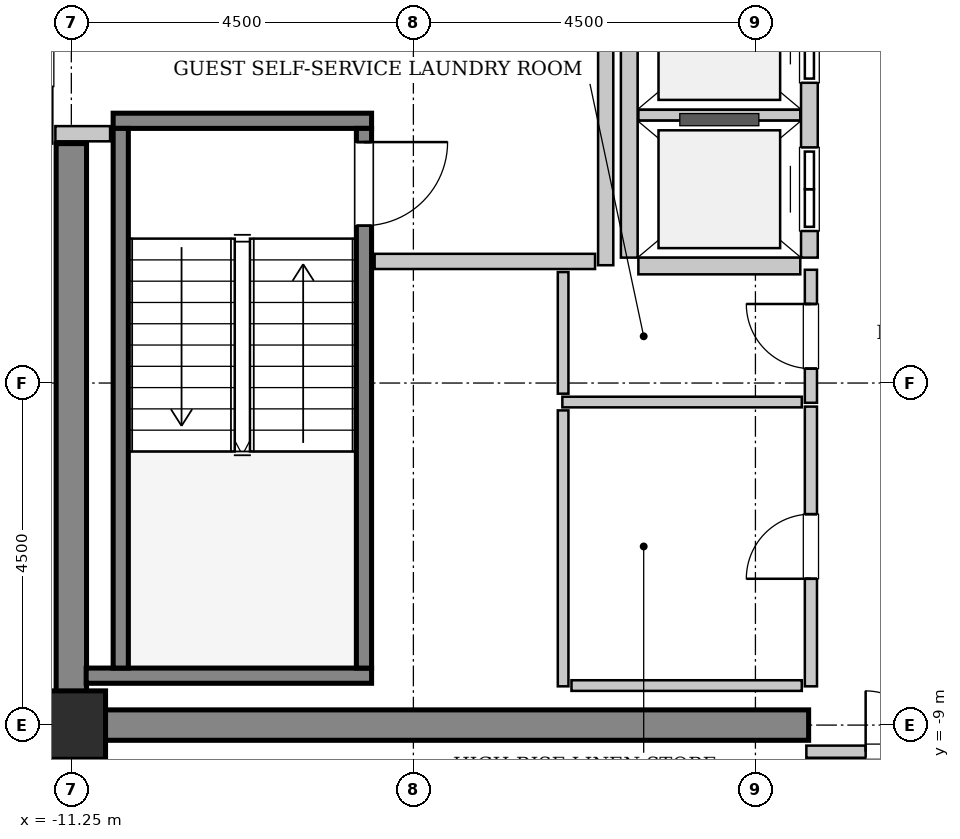
"""IFC4 building model, lengths in metres.
Left out: names, types, materials, properties, quantities, classifications, styles, units other than length and angle.
Written with IfcOpenShell. Run it as: python <this file> out.ifc"""

import sys

from ifc_helpers import new_model, si_unit, direction, frame, frame_2d, origin, origin_2d, place, context, subcontext, project, spatial, rectangle, extrude, source, transform, mapped, element, fill, save


model = new_model("IFC4")
c1 = context("Model", 3, precision=1e-05, world=origin(), true_north=direction((0.0, 1.0)))
c2 = subcontext(c1, "Body", "Model", "MODEL_VIEW")
j1 = project(units=[si_unit("LENGTHUNIT", "METRE"), si_unit("PLANEANGLEUNIT", "RADIAN")], contexts=[c1])
p1 = place(None, origin())
s1 = spatial("IfcSite", under=j1, at=p1, CompositionType="ELEMENT")
p2 = place(p1, origin())
s2 = spatial("IfcBuilding", under=s1, at=p2, CompositionType="ELEMENT")
p3 = place(p2, frame((0.0, 0.0, 345.2)))
s3 = spatial("IfcBuildingStorey", under=s2, at=p3, CompositionType="ELEMENT", Elevation=345.2)
m1 = source(origin(), c2, "Body", "SweptSolid", [
    extrude(rectangle(XDim=9.9, YDim=0.4, at=frame_2d((4.95, 0.0))), origin(), (0.0, 0.0, 1.0), 3.8),
])
p4 = place(p3, frame((-11.45, -9.0, 0.0), z_axis=(0.0, 0.0, 1.0), x_axis=(1.0, 0.0, 0.0)))
e1 = element("IfcWall", 1, at=p4, inside=s3, PredefinedType="SHEAR", context=c2, shape_type="MappedRepresentation", body=[
    mapped(m1, transform((0.0, 0.0, 0.0), x_axis=(1.0, 0.0, 0.0), y_axis=(0.0, 1.0, 0.0), z_axis=(0.0, 0.0, 1.0), scale=1.0)),
])
m2 = source(origin(), c2, "Body", "SweptSolid", [
    extrude(rectangle(XDim=7.45, YDim=0.4, at=frame_2d((3.725, 0.0))), origin(), (0.0, 0.0, 1.0), 3.8),
])
p5 = place(p3, frame((-11.25, -8.8, 0.0), z_axis=(0.0, 0.0, 1.0), x_axis=(0.0, 1.0, 0.0)))
e2 = element("IfcWall", 2, at=p5, inside=s3, PredefinedType="SHEAR", context=c2, shape_type="MappedRepresentation", body=[
    mapped(m2, transform((0.0, 0.0, 0.0), x_axis=(1.0, 0.0, 0.0), y_axis=(0.0, 1.0, 0.0), z_axis=(0.0, 0.0, 1.0), scale=1.0)),
])
m3 = source(origin(), c2, "Body", "SweptSolid", [
    extrude(rectangle(XDim=0.9, YDim=0.9, at=origin_2d()), origin(), (0.0, 0.0, 1.0), 3.8),
])
p6 = place(p3, frame((-11.25, -9.0, 0.0), z_axis=(0.0, 0.0, 1.0), x_axis=(1.0, 0.0, 0.0)))
e3 = element("IfcColumn", 3, at=p6, inside=s3, PredefinedType="COLUMN", context=c2, shape_type="MappedRepresentation", body=[
    mapped(m3, transform((0.0, 0.0, 0.0), x_axis=(1.0, 0.0, 0.0), y_axis=(0.0, 1.0, 0.0), z_axis=(0.0, 0.0, 1.0), scale=1.0)),
])
m4 = source(origin(), c2, "Body", "SweptSolid", [
    extrude(rectangle(XDim=3.4, YDim=0.2, at=frame_2d((1.7, 0.0))), origin(), (0.0, 0.0, 1.0), 3.8),
])
p7 = place(p3, frame((-10.7, -1.05, 0.0), z_axis=(0.0, 0.0, 1.0), x_axis=(1.0, 0.0, 0.0)))
e4 = element("IfcWall", 4, at=p7, inside=s3, PredefinedType="SOLIDWALL", context=c2, shape_type="MappedRepresentation", body=[
    mapped(m4, transform((0.0, 0.0, 0.0), x_axis=(1.0, 0.0, 0.0), y_axis=(0.0, 1.0, 0.0), z_axis=(0.0, 0.0, 1.0), scale=1.0)),
])
m5 = source(origin(), c2, "Body", "SweptSolid", [
    extrude(rectangle(XDim=3.755, YDim=0.2, at=frame_2d((1.877, 0.0))), origin(), (0.0, 0.0, 1.0), 3.8),
])
p8 = place(p3, frame((-11.055, -8.35, 0.0), z_axis=(0.0, 0.0, 1.0), x_axis=(1.0, 0.0, 0.0)))
e5 = element("IfcWall", 5, at=p8, inside=s3, PredefinedType="SOLIDWALL", context=c2, shape_type="MappedRepresentation", body=[
    mapped(m5, transform((0.0, 0.0, 0.0), x_axis=(1.0, 0.0, 0.0), y_axis=(0.0, 1.0, 0.0), z_axis=(0.0, 0.0, 1.0), scale=1.0)),
])
m6 = source(origin(), c2, "Body", "SweptSolid", [
    extrude(rectangle(XDim=7.1, YDim=0.2, at=frame_2d((3.55, 0.0))), origin(), (0.0, 0.0, 1.0), 3.8),
])
p9 = place(p3, frame((-10.6, -1.15, 0.0), z_axis=(0.0, 0.0, 1.0), x_axis=(0.0, -1.0, 0.0)))
e6 = element("IfcWall", 6, at=p9, inside=s3, PredefinedType="SOLIDWALL", context=c2, shape_type="MappedRepresentation", body=[
    mapped(m6, transform((0.0, 0.0, 0.0), x_axis=(1.0, 0.0, 0.0), y_axis=(0.0, 1.0, 0.0), z_axis=(0.0, 0.0, 1.0), scale=1.0)),
])
p10 = place(p3, frame((-7.4, -1.15, 0.0), z_axis=(0.0, 0.0, 1.0), x_axis=(0.0, -1.0, 0.0)))
e7 = element("IfcWall", 7, at=p10, inside=s3, PredefinedType="SOLIDWALL", context=c2, shape_type="MappedRepresentation", body=[
    mapped(m6, transform((0.0, 0.0, 0.0), x_axis=(1.0, 0.0, 0.0), y_axis=(0.0, 1.0, 0.0), z_axis=(0.0, 0.0, 1.0), scale=1.0)),
])
p11 = place(p10, frame((0.18, 0.0, 0.0)))
e8 = element("IfcOpeningElement", 8, at=p11, cuts=e7, PredefinedType="OPENING", context=c2, shape_type="SweptSolid", body=[
    extrude(rectangle(XDim=1.1, YDim=2.15, at=frame_2d((0.55, 1.075))), frame((0.0, 0.11, 0.0), z_axis=(0.0, -1.0, 0.0), x_axis=(1.0, 0.0, 0.0)), (0.0, 0.0, 1.0), 0.22),
])
m7 = source(origin(), c2, "Body", "SweptSolid", [
    extrude(rectangle(XDim=5.7, YDim=0.22, at=frame_2d((2.85, 0.0))), origin(), (0.0, 0.0, 1.0), 3.485),
])
p12 = place(p3, frame((-1.54, -2.85, 0.0), z_axis=(0.0, 0.0, 1.0), x_axis=(0.0, 1.0, 0.0)))
e9 = element("IfcWall", 9, at=p12, inside=s3, PredefinedType="SOLIDWALL", context=c2, shape_type="MappedRepresentation", body=[
    mapped(m7, transform((0.0, 0.0, 0.0), x_axis=(1.0, 0.0, 0.0), y_axis=(0.0, 1.0, 0.0), z_axis=(0.0, 0.0, 1.0), scale=1.0)),
])
p13 = place(p12, frame((0.35, 0.0, 0.0)))
e10 = element("IfcOpeningElement", 10, at=p13, cuts=e9, PredefinedType="OPENING", context=c2, shape_type="SweptSolid", body=[
    extrude(rectangle(XDim=1.1, YDim=2.2, at=frame_2d((0.55, 1.1))), frame((0.0, 0.12, 0.0), z_axis=(0.0, -1.0, 0.0), x_axis=(1.0, 0.0, 0.0)), (0.0, 0.0, 1.0), 0.24),
])
p14 = place(p12, frame((2.3, 0.0, 0.0)))
e11 = element("IfcOpeningElement", 11, at=p14, cuts=e9, PredefinedType="OPENING", context=c2, shape_type="SweptSolid", body=[
    extrude(rectangle(XDim=1.1, YDim=2.2, at=frame_2d((0.55, 1.1))), frame((0.0, 0.12, 0.0), z_axis=(0.0, -1.0, 0.0), x_axis=(1.0, 0.0, 0.0)), (0.0, 0.0, 1.0), 0.24),
])
p15 = place(p12, frame((4.25, 0.0, 0.0)))
e12 = element("IfcOpeningElement", 12, at=p15, cuts=e9, PredefinedType="OPENING", context=c2, shape_type="SweptSolid", body=[
    extrude(rectangle(XDim=1.1, YDim=2.2, at=frame_2d((0.55, 1.1))), frame((0.0, 0.12, 0.0), z_axis=(0.0, -1.0, 0.0), x_axis=(1.0, 0.0, 0.0)), (0.0, 0.0, 1.0), 0.24),
])
p16 = place(p3, frame((-3.91, 2.85, 0.0), z_axis=(0.0, 0.0, 1.0), x_axis=(0.0, -1.0, 0.0)))
e13 = element("IfcWall", 13, at=p16, inside=s3, PredefinedType="SOLIDWALL", context=c2, shape_type="MappedRepresentation", body=[
    mapped(m7, transform((0.0, 0.0, 0.0), x_axis=(1.0, 0.0, 0.0), y_axis=(0.0, 1.0, 0.0), z_axis=(0.0, 0.0, 1.0), scale=1.0)),
])
m8 = source(origin(), c2, "Body", "SweptSolid", [
    extrude(rectangle(XDim=2.13, YDim=0.22, at=frame_2d((1.065, 0.0))), origin(), (0.0, 0.0, 1.0), 3.485),
])
p17 = place(p3, frame((-3.79, -2.96, 0.0), z_axis=(0.0, 0.0, 1.0), x_axis=(1.0, 0.0, 0.0)))
e14 = element("IfcWall", 14, at=p17, inside=s3, PredefinedType="SOLIDWALL", context=c2, shape_type="MappedRepresentation", body=[
    mapped(m8, transform((0.0, 0.0, 0.0), x_axis=(1.0, 0.0, 0.0), y_axis=(0.0, 1.0, 0.0), z_axis=(0.0, 0.0, 1.0), scale=1.0)),
])
m9 = source(origin(), c2, "Body", "SweptSolid", [
    extrude(rectangle(XDim=2.13, YDim=0.14, at=frame_2d((1.065, 0.0))), origin(), (0.0, 0.0, 1.0), 3.485),
])
p18 = place(p3, frame((-3.79, -0.975, 0.0), z_axis=(0.0, 0.0, 1.0), x_axis=(1.0, 0.0, 0.0)))
e15 = element("IfcWall", 15, at=p18, inside=s3, PredefinedType="PARTITIONING", context=c2, shape_type="MappedRepresentation", body=[
    mapped(m9, transform((0.0, 0.0, 0.0), x_axis=(1.0, 0.0, 0.0), y_axis=(0.0, 1.0, 0.0), z_axis=(0.0, 0.0, 1.0), scale=1.0)),
])
m10 = source(origin(), c2, "Body", "SweptSolid", [
    extrude(rectangle(XDim=5.9, YDim=0.2, at=frame_2d((2.95, 0.0))), origin(), (0.0, 0.0, 1.0), 3.485),
])
p19 = place(p3, frame((-4.22, -2.95, 0.0), z_axis=(0.0, 0.0, 1.0), x_axis=(0.0, 1.0, 0.0)))
e16 = element("IfcWall", 16, at=p19, inside=s3, PredefinedType="PARTITIONING", context=c2, shape_type="MappedRepresentation", body=[
    mapped(m10, transform((0.0, 0.0, 0.0), x_axis=(1.0, 0.0, 0.0), y_axis=(0.0, 1.0, 0.0), z_axis=(0.0, 0.0, 1.0), scale=1.0)),
])
m11 = source(origin(), c2, "Body", "SweptSolid", [
    extrude(rectangle(XDim=2.9, YDim=0.2, at=frame_2d((1.45, 0.0))), origin(), (0.0, 0.0, 1.0), 3.485),
])
p20 = place(p3, frame((-7.26, -2.9, 0.0), z_axis=(0.0, 0.0, 1.0), x_axis=(1.0, 0.0, 0.0)))
e17 = element("IfcWall", 17, at=p20, inside=s3, PredefinedType="PARTITIONING", context=c2, shape_type="MappedRepresentation", body=[
    mapped(m11, transform((0.0, 0.0, 0.0), x_axis=(1.0, 0.0, 0.0), y_axis=(0.0, 1.0, 0.0), z_axis=(0.0, 0.0, 1.0), scale=1.0)),
])
m12 = source(origin(), c2, "Body", "SweptSolid", [
    extrude(rectangle(XDim=0.72, YDim=0.2, at=frame_2d((0.36, 0.0))), origin(), (0.0, 0.0, 1.0), 3.485),
])
p21 = place(p3, frame((-11.46, -1.22, 0.0), z_axis=(0.0, 0.0, 1.0), x_axis=(1.0, 0.0, 0.0)))
e18 = element("IfcWall", 18, at=p21, inside=s3, PredefinedType="PARTITIONING", context=c2, shape_type="MappedRepresentation", body=[
    mapped(m12, transform((0.0, 0.0, 0.0), x_axis=(1.0, 0.0, 0.0), y_axis=(0.0, 1.0, 0.0), z_axis=(0.0, 0.0, 1.0), scale=1.0)),
])
m13 = source(origin(), c2, "Body", "SweptSolid", [
    extrude(rectangle(XDim=3.16, YDim=0.16, at=frame_2d((1.58, 0.0))), origin(), (0.0, 0.0, 1.0), 2.575),
])
p22 = place(p3, frame((-1.58, -9.35, 0.0), z_axis=(0.0, 0.0, 1.0), x_axis=(1.0, 0.0, 0.0)))
e19 = element("IfcWall", 19, at=p22, inside=s3, PredefinedType="PARTITIONING", context=c2, shape_type="MappedRepresentation", body=[
    mapped(m13, transform((0.0, 0.0, 0.0), x_axis=(1.0, 0.0, 0.0), y_axis=(0.0, 1.0, 0.0), z_axis=(0.0, 0.0, 1.0), scale=1.0)),
])
p23 = place(p22, frame((0.78, 0.0, 0.0)))
e20 = element("IfcOpeningElement", 20, at=p23, cuts=e19, PredefinedType="OPENING", context=c2, shape_type="SweptSolid", body=[
    extrude(rectangle(XDim=1.6, YDim=2.3, at=frame_2d((0.8, 1.15))), frame((0.0, 0.09, 0.0), z_axis=(0.0, -1.0, 0.0), x_axis=(1.0, 0.0, 0.0)), (0.0, 0.0, 1.0), 0.18),
])
m14 = source(origin(), c2, "Body", "SweptSolid", [
    extrude(rectangle(XDim=1.75, YDim=0.16, at=frame_2d((0.875, 0.0))), origin(), (0.0, 0.0, 1.0), 3.485),
])
p24 = place(p3, frame((-1.52, -4.76, 0.0), z_axis=(0.0, 0.0, 1.0), x_axis=(0.0, 1.0, 0.0)))
e21 = element("IfcWall", 21, at=p24, inside=s3, PredefinedType="PARTITIONING", context=c2, shape_type="MappedRepresentation", body=[
    mapped(m14, transform((0.0, 0.0, 0.0), x_axis=(1.0, 0.0, 0.0), y_axis=(0.0, 1.0, 0.0), z_axis=(0.0, 0.0, 1.0), scale=1.0)),
])
p25 = place(p24, frame((0.45, 0.0, 0.0)))
e22 = element("IfcOpeningElement", 22, at=p25, cuts=e21, PredefinedType="OPENING", context=c2, shape_type="SweptSolid", body=[
    extrude(rectangle(XDim=0.85, YDim=2.1, at=frame_2d((0.425, 1.05))), frame((0.0, 0.09, 0.0), z_axis=(0.0, -1.0, 0.0), x_axis=(1.0, 0.0, 0.0)), (0.0, 0.0, 1.0), 0.18),
])
m15 = source(origin(), c2, "Body", "SweptSolid", [
    extrude(rectangle(XDim=3.15, YDim=0.14, at=frame_2d((1.575, 0.0))), origin(), (0.0, 0.0, 1.0), 3.485),
])
p26 = place(p3, frame((-4.79, -4.75, 0.0), z_axis=(0.0, 0.0, 1.0), x_axis=(1.0, 0.0, 0.0)))
e23 = element("IfcWall", 23, at=p26, inside=s3, PredefinedType="PARTITIONING", context=c2, shape_type="MappedRepresentation", body=[
    mapped(m15, transform((0.0, 0.0, 0.0), x_axis=(1.0, 0.0, 0.0), y_axis=(0.0, 1.0, 0.0), z_axis=(0.0, 0.0, 1.0), scale=1.0)),
])
m16 = source(origin(), c2, "Body", "SweptSolid", [
    extrude(rectangle(XDim=1.6, YDim=0.14, at=frame_2d((0.8, 0.0))), origin(), (0.0, 0.0, 1.0), 3.485),
])
p27 = place(p3, frame((-4.78, -4.64, 0.0), z_axis=(0.0, 0.0, 1.0), x_axis=(0.0, 1.0, 0.0)))
e24 = element("IfcWall", 24, at=p27, inside=s3, PredefinedType="PARTITIONING", context=c2, shape_type="MappedRepresentation", body=[
    mapped(m16, transform((0.0, 0.0, 0.0), x_axis=(1.0, 0.0, 0.0), y_axis=(0.0, 1.0, 0.0), z_axis=(0.0, 0.0, 1.0), scale=1.0)),
])
m17 = source(origin(), c2, "Body", "SweptSolid", [
    extrude(rectangle(XDim=3.68, YDim=0.16, at=frame_2d((1.84, 0.0))), origin(), (0.0, 0.0, 1.0), 3.485),
])
p28 = place(p3, frame((-1.52, -8.49, 0.0), z_axis=(0.0, 0.0, 1.0), x_axis=(0.0, 1.0, 0.0)))
e25 = element("IfcWall", 25, at=p28, inside=s3, PredefinedType="PARTITIONING", context=c2, shape_type="MappedRepresentation", body=[
    mapped(m17, transform((0.0, 0.0, 0.0), x_axis=(1.0, 0.0, 0.0), y_axis=(0.0, 1.0, 0.0), z_axis=(0.0, 0.0, 1.0), scale=1.0)),
])
p29 = place(p28, frame((1.415, 0.0, 0.0)))
e26 = element("IfcOpeningElement", 26, at=p29, cuts=e25, PredefinedType="OPENING", context=c2, shape_type="SweptSolid", body=[
    extrude(rectangle(XDim=0.85, YDim=2.1, at=frame_2d((0.425, 1.05))), frame((0.0, 0.09, 0.0), z_axis=(0.0, -1.0, 0.0), x_axis=(1.0, 0.0, 0.0)), (0.0, 0.0, 1.0), 0.18),
])
m18 = source(origin(), c2, "Body", "SweptSolid", [
    extrude(rectangle(XDim=3.63, YDim=0.14, at=frame_2d((1.815, 0.0))), origin(), (0.0, 0.0, 1.0), 3.485),
])
p30 = place(p3, frame((-4.78, -8.49, 0.0), z_axis=(0.0, 0.0, 1.0), x_axis=(0.0, 1.0, 0.0)))
e27 = element("IfcWall", 27, at=p30, inside=s3, PredefinedType="PARTITIONING", context=c2, shape_type="MappedRepresentation", body=[
    mapped(m18, transform((0.0, 0.0, 0.0), x_axis=(1.0, 0.0, 0.0), y_axis=(0.0, 1.0, 0.0), z_axis=(0.0, 0.0, 1.0), scale=1.0)),
])
m19 = source(origin(), c2, "Body", "SweptSolid", [
    extrude(rectangle(XDim=3.03, YDim=0.14, at=frame_2d((1.515, 0.0))), origin(), (0.0, 0.0, 1.0), 3.485),
])
p31 = place(p3, frame((-4.67, -8.48, 0.0), z_axis=(0.0, 0.0, 1.0), x_axis=(1.0, 0.0, 0.0)))
e28 = element("IfcWall", 28, at=p31, inside=s3, PredefinedType="PARTITIONING", context=c2, shape_type="MappedRepresentation", body=[
    mapped(m19, transform((0.0, 0.0, 0.0), x_axis=(1.0, 0.0, 0.0), y_axis=(0.0, 1.0, 0.0), z_axis=(0.0, 0.0, 1.0), scale=1.0)),
])
m20 = source(origin(), c2, "Body", "SweptSolid", [
    extrude(rectangle(XDim=1.1, YDim=2.15, at=frame_2d((0.55, 1.075))), frame((0.0, 0.025, 0.0), z_axis=(0.0, -1.0, 0.0), x_axis=(1.0, 0.0, 0.0)), (0.0, 0.0, 1.0), 0.05),
])
p32 = place(p11, origin())
e29 = element("IfcDoor", 29, at=p32, inside=s3, OperationType="SINGLE_SWING_LEFT", PredefinedType="DOOR", context=c2, shape_type="MappedRepresentation", body=[
    mapped(m20, transform((0.0, 0.0, 0.0), x_axis=(1.0, 0.0, 0.0), y_axis=(0.0, 1.0, 0.0), z_axis=(0.0, 0.0, 1.0), scale=1.0)),
])
fill(e8, e29)
m21 = source(origin(), c2, "Body", "SweptSolid", [
    extrude(rectangle(XDim=1.1, YDim=2.2, at=frame_2d((0.55, 1.1))), frame((0.0, 0.025, 0.0), z_axis=(0.0, -1.0, 0.0), x_axis=(1.0, 0.0, 0.0)), (0.0, 0.0, 1.0), 0.05),
])
p33 = place(p13, origin())
e30 = element("IfcDoor", 30, at=p33, inside=s3, OperationType="DOUBLE_DOOR_SLIDING", PredefinedType="DOOR", context=c2, shape_type="MappedRepresentation", body=[
    mapped(m21, transform((0.0, 0.0, 0.0), x_axis=(1.0, 0.0, 0.0), y_axis=(0.0, 1.0, 0.0), z_axis=(0.0, 0.0, 1.0), scale=1.0)),
])
fill(e10, e30)
p34 = place(p14, origin())
e31 = element("IfcDoor", 31, at=p34, inside=s3, OperationType="DOUBLE_DOOR_SLIDING", PredefinedType="DOOR", context=c2, shape_type="MappedRepresentation", body=[
    mapped(m21, transform((0.0, 0.0, 0.0), x_axis=(1.0, 0.0, 0.0), y_axis=(0.0, 1.0, 0.0), z_axis=(0.0, 0.0, 1.0), scale=1.0)),
])
fill(e11, e31)
m22 = source(origin(), c2, "Body", "SweptSolid", [
    extrude(rectangle(XDim=1.6, YDim=2.3, at=frame_2d((0.8, 1.15))), frame((0.0, 0.025, 0.0), z_axis=(0.0, -1.0, 0.0), x_axis=(1.0, 0.0, 0.0)), (0.0, 0.0, 1.0), 0.05),
])
p35 = place(p23, origin())
e32 = element("IfcDoor", 32, at=p35, inside=s3, OperationType="DOUBLE_DOOR_SINGLE_SWING", PredefinedType="DOOR", context=c2, shape_type="MappedRepresentation", body=[
    mapped(m22, transform((0.0, 0.0, 0.0), x_axis=(1.0, 0.0, 0.0), y_axis=(0.0, 1.0, 0.0), z_axis=(0.0, 0.0, 1.0), scale=1.0)),
])
fill(e20, e32)
m23 = source(origin(), c2, "Body", "SweptSolid", [
    extrude(rectangle(XDim=0.85, YDim=2.1, at=frame_2d((0.425, 1.05))), frame((0.0, 0.025, 0.0), z_axis=(0.0, -1.0, 0.0), x_axis=(1.0, 0.0, 0.0)), (0.0, 0.0, 1.0), 0.05),
])
p36 = place(p25, origin())
e33 = element("IfcDoor", 33, at=p36, inside=s3, OperationType="SINGLE_SWING_RIGHT", PredefinedType="DOOR", context=c2, shape_type="MappedRepresentation", body=[
    mapped(m23, transform((0.0, 0.0, 0.0), x_axis=(1.0, 0.0, 0.0), y_axis=(0.0, 1.0, 0.0), z_axis=(0.0, 0.0, 1.0), scale=1.0)),
])
fill(e22, e33)
p37 = place(p29, origin())
e34 = element("IfcDoor", 34, at=p37, inside=s3, OperationType="SINGLE_SWING_LEFT", PredefinedType="DOOR", context=c2, shape_type="MappedRepresentation", body=[
    mapped(m23, transform((0.0, 0.0, 0.0), x_axis=(1.0, 0.0, 0.0), y_axis=(0.0, 1.0, 0.0), z_axis=(0.0, 0.0, 1.0), scale=1.0)),
])
fill(e26, e34)
save(model, sys.argv[1])
